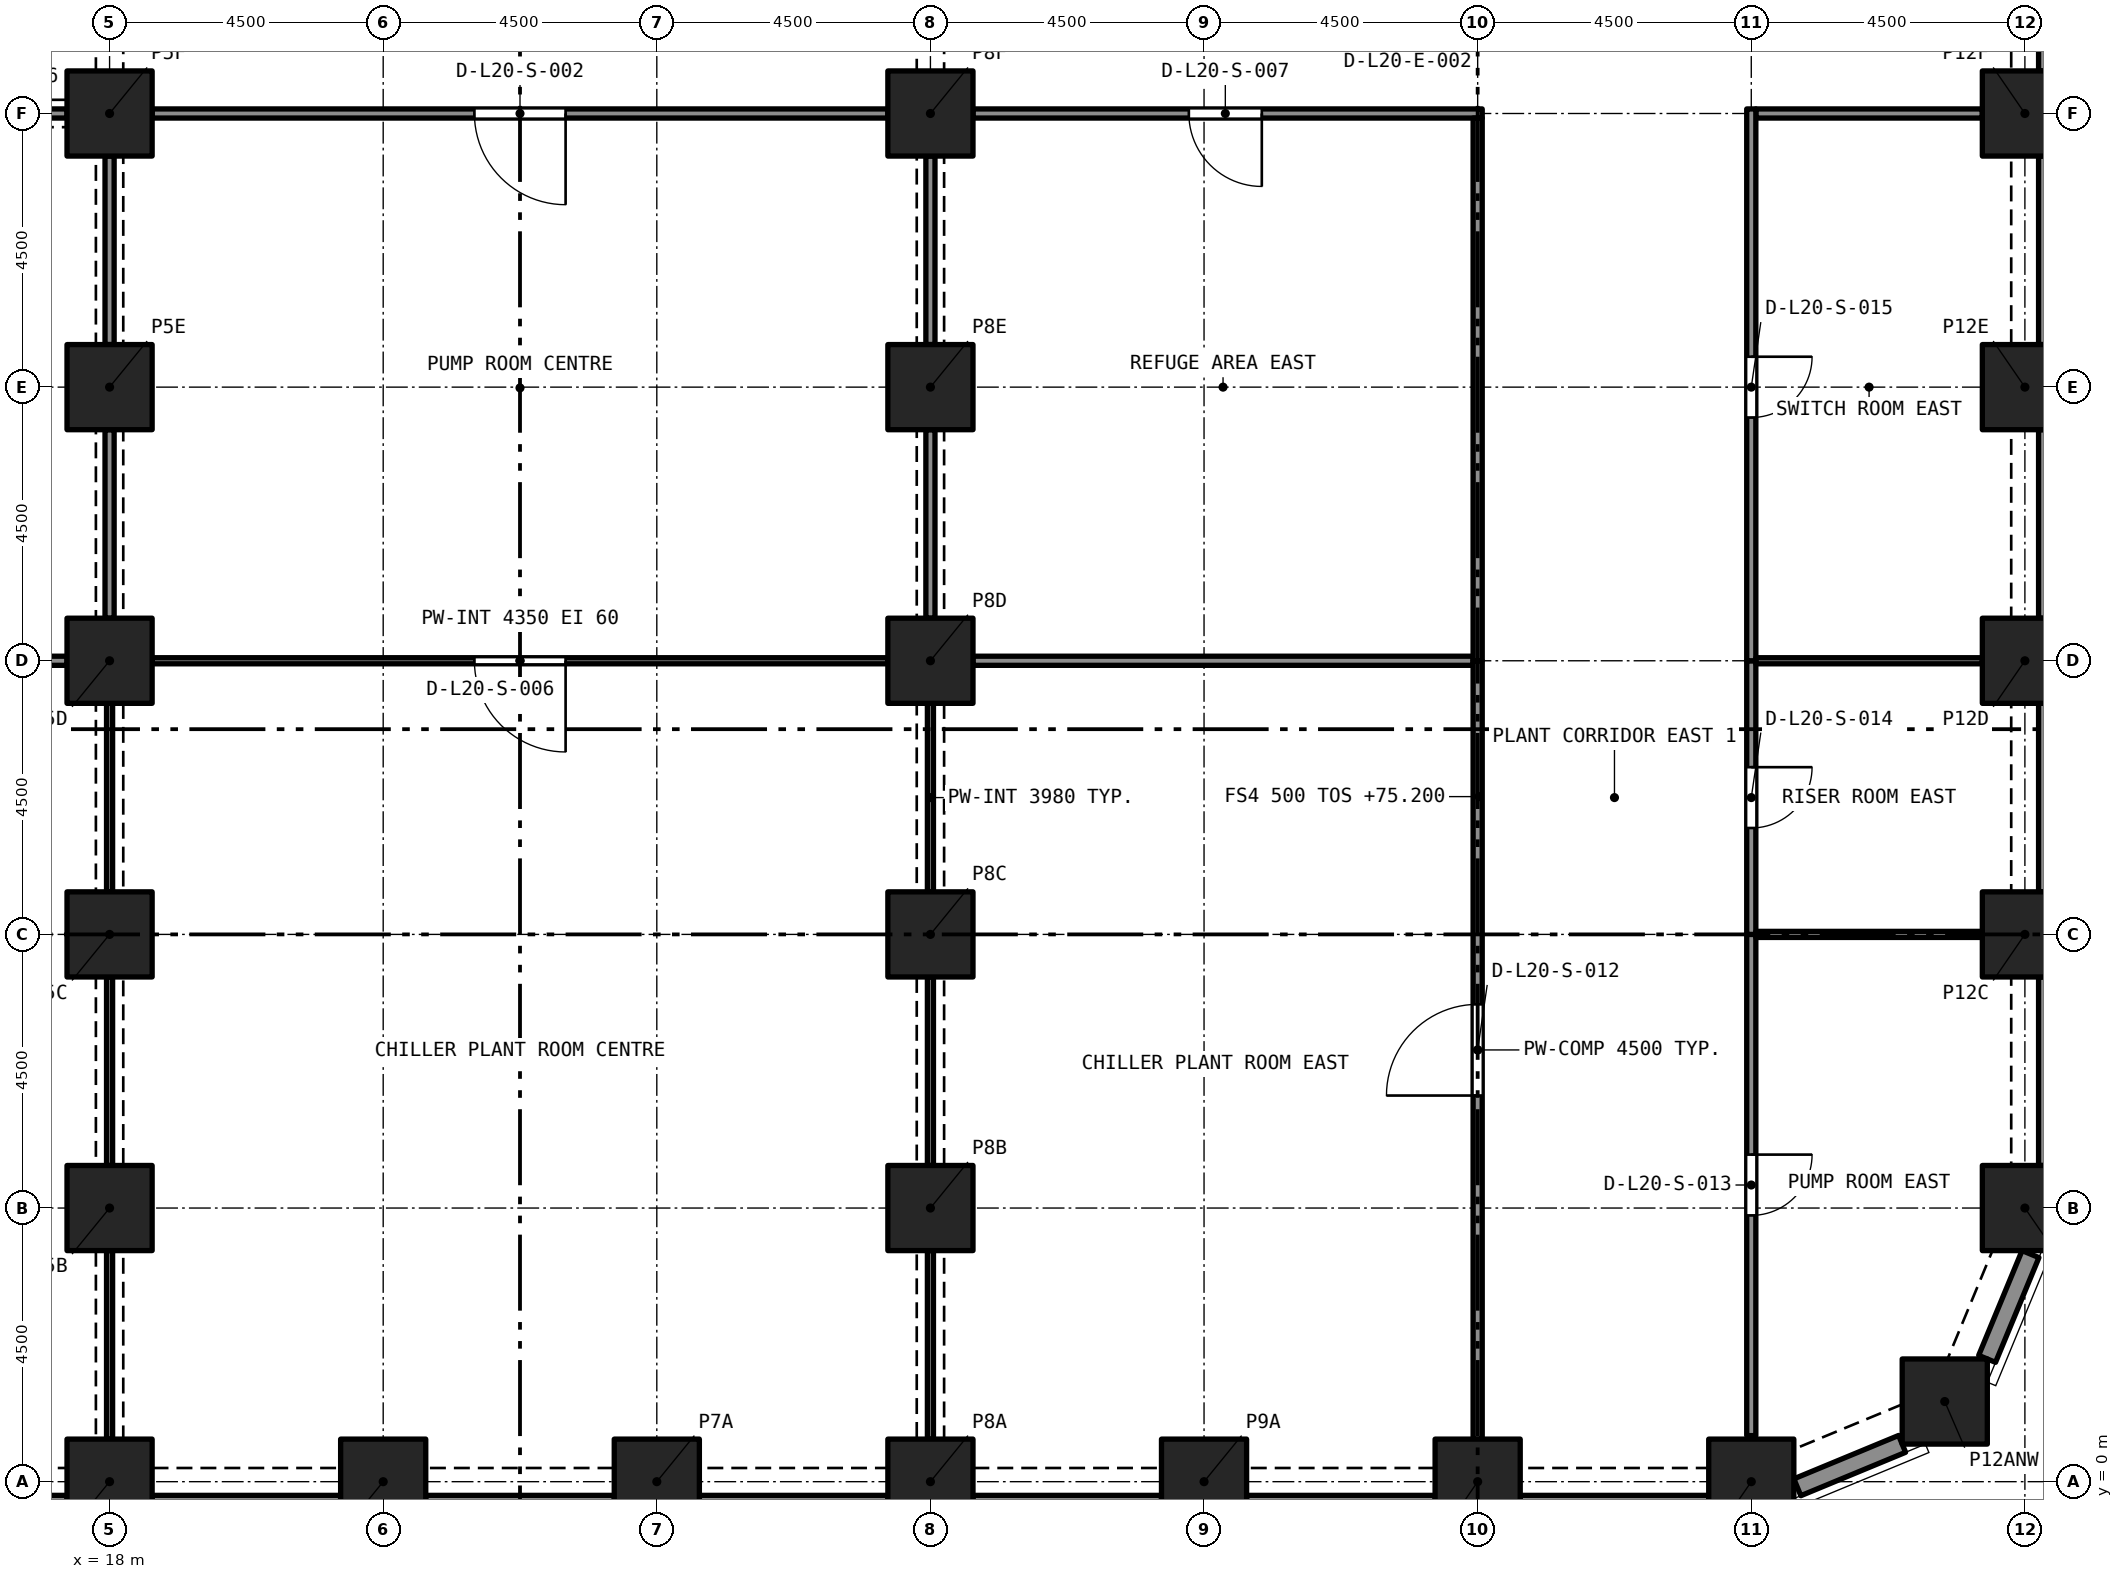
"""IFC4 building model, lengths in metres.
Left out: names, types, materials, properties, quantities, classifications, styles, units other than length and angle.
Written with IfcOpenShell. Run it as: python <this file> out.ifc"""

import sys

from ifc_helpers import new_model, si_unit, direction, frame, frame_2d, origin, origin_2d, place, context, subcontext, project, spatial, rectangle, extrude, element, fill, save


model = new_model("IFC4")
c1 = context("Model", 3, precision=1e-05, world=origin(), true_north=direction((0.0, 1.0)))
c2 = subcontext(c1, "Body", "Model", "MODEL_VIEW")
j1 = project(units=[si_unit("LENGTHUNIT", "METRE"), si_unit("PLANEANGLEUNIT", "RADIAN")], contexts=[c1])
p1 = place(None, origin())
s1 = spatial("IfcSite", under=j1, at=p1, CompositionType="ELEMENT")
p2 = place(p1, origin())
s2 = spatial("IfcBuilding", under=s1, at=p2, CompositionType="ELEMENT")
p3 = place(p2, frame((0.0, 0.0, 75.2)))
s3 = spatial("IfcBuildingStorey", under=s2, at=p3, CompositionType="ELEMENT", Elevation=75.2)
for number, where, z_axis, x_axis in (
    (1, (18.0, 0.0, 0.0), (0.0, 0.0, 1.0), (1.0, 0.0, 0.0)),
    (2, (22.5, 0.0, 0.0), (0.0, 0.0, 1.0), (1.0, 0.0, 0.0)),
    (3, (27.0, 0.0, 0.0), (0.0, 0.0, 1.0), (1.0, 0.0, 0.0)),
    (4, (31.5, 0.0, 0.0), (0.0, 0.0, 1.0), (1.0, 0.0, 0.0)),
    (5, (36.0, 0.0, 0.0), (0.0, 0.0, 1.0), (1.0, 0.0, 0.0)),
    (6, (40.5, 0.0, 0.0), (0.0, 0.0, 1.0), (1.0, 0.0, 0.0)),
    (7, (45.0, 0.0, 0.0), (0.0, 0.0, 1.0), (1.0, 0.0, 0.0)),
    (8, (48.182, 1.318, 0.0), (0.0, 0.0, 1.0), (1.0, 0.0, 0.0)),
    (9, (18.0, 4.5, 0.0), (0.0, 0.0, 1.0), (1.0, 0.0, 0.0)),
    (10, (31.5, 4.5, 0.0), (0.0, 0.0, 1.0), (1.0, 0.0, 0.0)),
    (11, (49.5, 4.5, 0.0), (0.0, 0.0, 1.0), (1.0, 0.0, 0.0)),
    (12, (18.0, 9.0, 0.0), (0.0, 0.0, 1.0), (1.0, 0.0, 0.0)),
    (13, (31.5, 9.0, 0.0), (0.0, 0.0, 1.0), (1.0, 0.0, 0.0)),
    (14, (49.5, 9.0, 0.0), (0.0, 0.0, 1.0), (1.0, 0.0, 0.0)),
    (15, (18.0, 13.5, 0.0), (0.0, 0.0, 1.0), (1.0, 0.0, 0.0)),
    (16, (31.5, 13.5, 0.0), (0.0, 0.0, 1.0), (1.0, 0.0, 0.0)),
    (17, (49.5, 13.5, 0.0), (0.0, 0.0, 1.0), (1.0, 0.0, 0.0)),
    (18, (18.0, 18.0, 0.0), (0.0, 0.0, 1.0), (1.0, 0.0, 0.0)),
    (19, (31.5, 18.0, 0.0), (0.0, 0.0, 1.0), (1.0, 0.0, 0.0)),
    (20, (49.5, 18.0, 0.0), (0.0, 0.0, 1.0), (1.0, 0.0, 0.0)),
    (21, (18.0, 22.5, 0.0), (0.0, 0.0, 1.0), (1.0, 0.0, 0.0)),
    (22, (31.5, 22.5, 0.0), (0.0, 0.0, 1.0), (1.0, 0.0, 0.0)),
    (23, (49.5, 22.5, 0.0), (0.0, 0.0, 1.0), (1.0, 0.0, 0.0)),
):
    element("IfcColumn", number, at=place(p3, frame(where, z_axis=z_axis, x_axis=x_axis)), inside=s3, PredefinedType="COLUMN", context=c2, shape_type="SweptSolid", body=[
        extrude(rectangle(XDim=1.4, YDim=1.4, at=origin_2d()), origin(), (0.0, 0.0, 1.0), 4.8),
    ])
for number, where, z_axis, x_axis in (
    (24, (17.3, -0.375, 0.0), (0.0, 0.0, 1.0), (-1.0, 0.0, 0.0)),
    (25, (21.8, -0.375, 0.0), (0.0, 0.0, 1.0), (-1.0, 0.0, 0.0)),
    (26, (26.3, -0.375, 0.0), (0.0, 0.0, 1.0), (-1.0, 0.0, 0.0)),
    (27, (30.8, -0.375, 0.0), (0.0, 0.0, 1.0), (-1.0, 0.0, 0.0)),
    (28, (35.3, -0.375, 0.0), (0.0, 0.0, 1.0), (-1.0, 0.0, 0.0)),
    (29, (39.8, -0.375, 0.0), (0.0, 0.0, 1.0), (-1.0, 0.0, 0.0)),
    (30, (44.3, -0.375, 0.0), (0.0, 0.0, 1.0), (-1.0, 0.0, 0.0)),
):
    element("IfcWall", number, at=place(p3, frame(where, z_axis=z_axis, x_axis=x_axis)), inside=s3, PredefinedType="SOLIDWALL", context=c2, shape_type="SweptSolid", body=[
        extrude(rectangle(XDim=3.1, YDim=0.3, at=frame_2d((1.55, 0.0))), origin(), (0.0, 0.0, 1.0), 4.8),
    ])
p4 = place(p3, frame((47.48, 0.622, 0.0), z_axis=(0.0, 0.0, 1.0), x_axis=(-0.923903565336, -0.38262540684, 0.0)))
e31 = element("IfcWall", 31, at=p4, inside=s3, PredefinedType="SOLIDWALL", context=c2, shape_type="SweptSolid", body=[
    extrude(rectangle(XDim=1.865, YDim=0.3, at=frame_2d((0.933, 0.0))), origin(), (0.0, 0.0, 1.0), 4.8),
])
p5 = place(p3, frame((49.592, 3.743, 0.0), z_axis=(0.0, 0.0, 1.0), x_axis=(-0.382737135771, -0.923857286003, 0.0)))
e32 = element("IfcWall", 32, at=p5, inside=s3, PredefinedType="SOLIDWALL", context=c2, shape_type="SweptSolid", body=[
    extrude(rectangle(XDim=1.865, YDim=0.3, at=frame_2d((0.933, 0.0))), origin(), (0.0, 0.0, 1.0), 4.8),
])
for number, where, z_axis, x_axis in (
    (33, (49.875, 8.3, 0.0), (0.0, 0.0, 1.0), (0.0, -1.0, 0.0)),
    (34, (49.875, 12.8, 0.0), (0.0, 0.0, 1.0), (0.0, -1.0, 0.0)),
    (35, (49.875, 17.3, 0.0), (0.0, 0.0, 1.0), (0.0, -1.0, 0.0)),
    (36, (49.875, 21.8, 0.0), (0.0, 0.0, 1.0), (0.0, -1.0, 0.0)),
    (37, (49.875, 26.3, 0.0), (0.0, 0.0, 1.0), (0.0, -1.0, 0.0)),
):
    element("IfcWall", number, at=place(p3, frame(where, z_axis=z_axis, x_axis=x_axis)), inside=s3, PredefinedType="SOLIDWALL", context=c2, shape_type="SweptSolid", body=[
        extrude(rectangle(XDim=3.1, YDim=0.3, at=frame_2d((1.55, 0.0))), origin(), (0.0, 0.0, 1.0), 4.8),
    ])
p6 = place(p3, frame((30.8, 22.5, 0.0), z_axis=(0.0, 0.0, 1.0), x_axis=(-1.0, 0.0, 0.0)))
e38 = element("IfcWall", 38, at=p6, inside=s3, PredefinedType="PARTITIONING", context=c2, shape_type="SweptSolid", body=[
    extrude(rectangle(XDim=12.1, YDim=0.15, at=frame_2d((6.05, 0.0))), origin(), (0.0, 0.0, 1.0), 4.35),
])
p7 = place(p6, frame((5.3, 0.0, 0.0)))
e39 = element("IfcOpeningElement", 39, at=p7, cuts=e38, PredefinedType="OPENING", context=c2, shape_type="SweptSolid", body=[
    extrude(rectangle(XDim=1.5, YDim=2.4, at=frame_2d((0.75, 1.2))), frame((0.0, 0.085, 0.0), z_axis=(0.0, -1.0, 0.0), x_axis=(1.0, 0.0, 0.0)), (0.0, 0.0, 1.0), 0.17),
])
p8 = place(p3, frame((30.8, 13.5, 0.0), z_axis=(0.0, 0.0, 1.0), x_axis=(-1.0, 0.0, 0.0)))
e40 = element("IfcWall", 40, at=p8, inside=s3, PredefinedType="PARTITIONING", context=c2, shape_type="SweptSolid", body=[
    extrude(rectangle(XDim=12.1, YDim=0.1, at=frame_2d((6.05, 0.0))), origin(), (0.0, 0.0, 1.0), 4.35),
])
p9 = place(p8, frame((5.3, 0.0, 0.0)))
e41 = element("IfcOpeningElement", 41, at=p9, cuts=e40, PredefinedType="OPENING", context=c2, shape_type="SweptSolid", body=[
    extrude(rectangle(XDim=1.5, YDim=2.4, at=frame_2d((0.75, 1.2))), frame((0.0, 0.06, 0.0), z_axis=(0.0, -1.0, 0.0), x_axis=(1.0, 0.0, 0.0)), (0.0, 0.0, 1.0), 0.12),
])
for number, where, z_axis, x_axis in (
    (42, (31.5, 9.7, 0.0), (0.0, 0.0, 1.0), (0.0, 1.0, 0.0)),
    (43, (31.5, 5.2, 0.0), (0.0, 0.0, 1.0), (0.0, 1.0, 0.0)),
    (44, (31.5, 0.7, 0.0), (0.0, 0.0, 1.0), (0.0, 1.0, 0.0)),
    (45, (18.0, 0.7, 0.0), (0.0, 0.0, 1.0), (0.0, 1.0, 0.0)),
    (46, (18.0, 5.2, 0.0), (0.0, 0.0, 1.0), (0.0, 1.0, 0.0)),
    (47, (18.0, 9.7, 0.0), (0.0, 0.0, 1.0), (0.0, 1.0, 0.0)),
):
    element("IfcWall", number, at=place(p3, frame(where, z_axis=z_axis, x_axis=x_axis)), inside=s3, PredefinedType="PARTITIONING", context=c2, shape_type="SweptSolid", body=[
        extrude(rectangle(XDim=3.1, YDim=0.1, at=frame_2d((1.55, 0.0))), origin(), (0.0, 0.0, 1.0), 3.98),
    ])
for number, where, z_axis, x_axis in (
    (48, (31.5, 18.7, 0.0), (0.0, 0.0, 1.0), (0.0, 1.0, 0.0)),
    (49, (31.5, 14.2, 0.0), (0.0, 0.0, 1.0), (0.0, 1.0, 0.0)),
    (50, (18.0, 14.2, 0.0), (0.0, 0.0, 1.0), (0.0, 1.0, 0.0)),
    (51, (18.0, 18.7, 0.0), (0.0, 0.0, 1.0), (0.0, 1.0, 0.0)),
):
    element("IfcWall", number, at=place(p3, frame(where, z_axis=z_axis, x_axis=x_axis)), inside=s3, PredefinedType="PARTITIONING", context=c2, shape_type="SweptSolid", body=[
        extrude(rectangle(XDim=3.1, YDim=0.15, at=frame_2d((1.55, 0.0))), origin(), (0.0, 0.0, 1.0), 3.98),
    ])
p10 = place(p3, frame((40.575, 22.5, 0.0), z_axis=(0.0, 0.0, 1.0), x_axis=(-1.0, 0.0, 0.0)))
e52 = element("IfcWall", 52, at=p10, inside=s3, PredefinedType="PARTITIONING", context=c2, shape_type="SweptSolid", body=[
    extrude(rectangle(XDim=8.375, YDim=0.15, at=frame_2d((4.188, 0.0))), origin(), (0.0, 0.0, 1.0), 4.5),
])
p11 = place(p10, frame((3.625, 0.0, 0.0)))
e53 = element("IfcOpeningElement", 53, at=p11, cuts=e52, PredefinedType="OPENING", context=c2, shape_type="SweptSolid", body=[
    extrude(rectangle(XDim=1.2, YDim=2.1, at=frame_2d((0.6, 1.05))), frame((0.0, 0.085, 0.0), z_axis=(0.0, -1.0, 0.0), x_axis=(1.0, 0.0, 0.0)), (0.0, 0.0, 1.0), 0.17),
])
p12 = place(p3, frame((45.075, 22.5, 0.0), z_axis=(0.0, 0.0, 1.0), x_axis=(1.0, 0.0, 0.0)))
e54 = element("IfcWall", 54, at=p12, inside=s3, PredefinedType="PARTITIONING", context=c2, shape_type="SweptSolid", body=[
    extrude(rectangle(XDim=3.725, YDim=0.15, at=frame_2d((1.863, 0.0))), origin(), (0.0, 0.0, 1.0), 4.5),
])
p13 = place(p3, frame((32.2, 13.5, 0.0), z_axis=(0.0, 0.0, 1.0), x_axis=(1.0, 0.0, 0.0)))
e55 = element("IfcWall", 55, at=p13, inside=s3, PredefinedType="PARTITIONING", context=c2, shape_type="SweptSolid", body=[
    extrude(rectangle(XDim=8.225, YDim=0.15, at=frame_2d((4.113, 0.0))), origin(), (0.0, 0.0, 1.0), 4.5),
])
p14 = place(p3, frame((40.5, 0.7, 0.0), z_axis=(0.0, 0.0, 1.0), x_axis=(0.0, 1.0, 0.0)))
e56 = element("IfcWall", 56, at=p14, inside=s3, PredefinedType="PARTITIONING", context=c2, shape_type="SweptSolid", body=[
    extrude(rectangle(XDim=12.8, YDim=0.15, at=frame_2d((6.4, 0.0))), origin(), (0.0, 0.0, 1.0), 4.5),
])
p15 = place(p14, frame((5.65, 0.0, 0.0)))
e57 = element("IfcOpeningElement", 57, at=p15, cuts=e56, PredefinedType="OPENING", context=c2, shape_type="SweptSolid", body=[
    extrude(rectangle(XDim=1.5, YDim=2.4, at=frame_2d((0.75, 1.2))), frame((0.0, 0.085, 0.0), z_axis=(0.0, -1.0, 0.0), x_axis=(1.0, 0.0, 0.0)), (0.0, 0.0, 1.0), 0.17),
])
p16 = place(p3, frame((40.5, 13.5, 0.0), z_axis=(0.0, 0.0, 1.0), x_axis=(0.0, 1.0, 0.0)))
e58 = element("IfcWall", 58, at=p16, inside=s3, PredefinedType="PARTITIONING", context=c2, shape_type="SweptSolid", body=[
    extrude(rectangle(XDim=8.925, YDim=0.15, at=frame_2d((4.462, 0.0))), origin(), (0.0, 0.0, 1.0), 4.5),
])
p17 = place(p3, frame((45.0, 9.0, 0.0), z_axis=(0.0, 0.0, 1.0), x_axis=(0.0, -1.0, 0.0)))
e59 = element("IfcWall", 59, at=p17, inside=s3, PredefinedType="PARTITIONING", context=c2, shape_type="SweptSolid", body=[
    extrude(rectangle(XDim=8.242, YDim=0.15, at=frame_2d((4.121, 0.0))), origin(), (0.0, 0.0, 1.0), 4.5),
])
p18 = place(p17, frame((3.621, 0.0, 0.0)))
e60 = element("IfcOpeningElement", 60, at=p18, cuts=e59, PredefinedType="OPENING", context=c2, shape_type="SweptSolid", body=[
    extrude(rectangle(XDim=1.0, YDim=2.1, at=frame_2d((0.5, 1.05))), frame((0.0, 0.085, 0.0), z_axis=(0.0, -1.0, 0.0), x_axis=(1.0, 0.0, 0.0)), (0.0, 0.0, 1.0), 0.17),
])
p19 = place(p3, frame((45.0, 13.5, 0.0), z_axis=(0.0, 0.0, 1.0), x_axis=(0.0, -1.0, 0.0)))
e61 = element("IfcWall", 61, at=p19, inside=s3, PredefinedType="PARTITIONING", context=c2, shape_type="SweptSolid", body=[
    extrude(rectangle(XDim=4.5, YDim=0.15, at=frame_2d((2.25, 0.0))), origin(), (0.0, 0.0, 1.0), 4.5),
])
p20 = place(p19, frame((1.75, 0.0, 0.0)))
e62 = element("IfcOpeningElement", 62, at=p20, cuts=e61, PredefinedType="OPENING", context=c2, shape_type="SweptSolid", body=[
    extrude(rectangle(XDim=1.0, YDim=2.1, at=frame_2d((0.5, 1.05))), frame((0.0, 0.085, 0.0), z_axis=(0.0, -1.0, 0.0), x_axis=(1.0, 0.0, 0.0)), (0.0, 0.0, 1.0), 0.17),
])
p21 = place(p3, frame((45.0, 22.575, 0.0), z_axis=(0.0, 0.0, 1.0), x_axis=(0.0, -1.0, 0.0)))
e63 = element("IfcWall", 63, at=p21, inside=s3, PredefinedType="PARTITIONING", context=c2, shape_type="SweptSolid", body=[
    extrude(rectangle(XDim=9.075, YDim=0.15, at=frame_2d((4.538, 0.0))), origin(), (0.0, 0.0, 1.0), 4.5),
])
p22 = place(p21, frame((4.075, 0.0, 0.0)))
e64 = element("IfcOpeningElement", 64, at=p22, cuts=e63, PredefinedType="OPENING", context=c2, shape_type="SweptSolid", body=[
    extrude(rectangle(XDim=1.0, YDim=2.1, at=frame_2d((0.5, 1.05))), frame((0.0, 0.085, 0.0), z_axis=(0.0, -1.0, 0.0), x_axis=(1.0, 0.0, 0.0)), (0.0, 0.0, 1.0), 0.17),
])
for number, where, z_axis, x_axis in (
    (65, (45.075, 9.0, 0.0), (0.0, 0.0, 1.0), (1.0, 0.0, 0.0)),
    (66, (45.075, 13.5, 0.0), (0.0, 0.0, 1.0), (1.0, 0.0, 0.0)),
):
    element("IfcWall", number, at=place(p3, frame(where, z_axis=z_axis, x_axis=x_axis)), inside=s3, PredefinedType="PARTITIONING", context=c2, shape_type="SweptSolid", body=[
        extrude(rectangle(XDim=3.725, YDim=0.1, at=frame_2d((1.863, 0.0))), origin(), (0.0, 0.0, 1.0), 4.5),
    ])
p23 = place(p3, frame((17.3, 22.5, 0.0), z_axis=(0.0, 0.0, 1.0), x_axis=(-1.0, 0.0, 0.0)))
e67 = element("IfcWall", 67, at=p23, inside=s3, PredefinedType="PARTITIONING", context=c2, shape_type="SweptSolid", body=[
    extrude(rectangle(XDim=3.1, YDim=0.15, at=frame_2d((1.55, 0.0))), origin(), (0.0, 0.0, 1.0), 3.98),
])
p24 = place(p23, frame((0.95, 0.0, 0.0)))
e68 = element("IfcOpeningElement", 68, at=p24, cuts=e67, PredefinedType="OPENING", context=c2, shape_type="SweptSolid", body=[
    extrude(rectangle(XDim=1.2, YDim=2.1, at=frame_2d((0.6, 1.05))), frame((0.0, 0.085, 0.0), z_axis=(0.0, -1.0, 0.0), x_axis=(1.0, 0.0, 0.0)), (0.0, 0.0, 1.0), 0.17),
])
p25 = place(p3, frame((9.075, 13.5, 0.0), z_axis=(0.0, 0.0, 1.0), x_axis=(1.0, 0.0, 0.0)))
e69 = element("IfcWall", 69, at=p25, inside=s3, PredefinedType="PARTITIONING", context=c2, shape_type="SweptSolid", body=[
    extrude(rectangle(XDim=8.225, YDim=0.15, at=frame_2d((4.113, 0.0))), origin(), (0.0, 0.0, 1.0), 4.5),
])
p26 = place(p7, origin())
e70 = element("IfcDoor", 70, at=p26, inside=s3, OperationType="DOUBLE_DOOR_SINGLE_SWING", PredefinedType="DOOR", context=c2, shape_type="SweptSolid", body=[
    extrude(rectangle(XDim=1.5, YDim=2.4, at=frame_2d((0.75, 1.2))), frame((0.0, 0.025, 0.0), z_axis=(0.0, -1.0, 0.0), x_axis=(1.0, 0.0, 0.0)), (0.0, 0.0, 1.0), 0.05),
])
fill(e39, e70)
p27 = place(p9, origin())
e71 = element("IfcDoor", 71, at=p27, inside=s3, OperationType="DOUBLE_DOOR_SINGLE_SWING", PredefinedType="DOOR", context=c2, shape_type="SweptSolid", body=[
    extrude(rectangle(XDim=1.5, YDim=2.4, at=frame_2d((0.75, 1.2))), frame((0.0, 0.025, 0.0), z_axis=(0.0, -1.0, 0.0), x_axis=(1.0, 0.0, 0.0)), (0.0, 0.0, 1.0), 0.05),
])
fill(e41, e71)
p28 = place(p11, origin())
e72 = element("IfcDoor", 72, at=p28, inside=s3, OperationType="SINGLE_SWING_RIGHT", PredefinedType="DOOR", context=c2, shape_type="SweptSolid", body=[
    extrude(rectangle(XDim=1.2, YDim=2.1, at=frame_2d((0.6, 1.05))), frame((0.0, 0.025, 0.0), z_axis=(0.0, -1.0, 0.0), x_axis=(1.0, 0.0, 0.0)), (0.0, 0.0, 1.0), 0.05),
])
fill(e53, e72)
p29 = place(p15, origin())
e73 = element("IfcDoor", 73, at=p29, inside=s3, OperationType="DOUBLE_DOOR_SINGLE_SWING", PredefinedType="DOOR", context=c2, shape_type="SweptSolid", body=[
    extrude(rectangle(XDim=1.5, YDim=2.4, at=frame_2d((0.75, 1.2))), frame((0.0, 0.025, 0.0), z_axis=(0.0, -1.0, 0.0), x_axis=(1.0, 0.0, 0.0)), (0.0, 0.0, 1.0), 0.05),
])
fill(e57, e73)
p30 = place(p18, origin())
e74 = element("IfcDoor", 74, at=p30, inside=s3, OperationType="SINGLE_SWING_RIGHT", PredefinedType="DOOR", context=c2, shape_type="SweptSolid", body=[
    extrude(rectangle(XDim=1.0, YDim=2.1, at=frame_2d((0.5, 1.05))), frame((0.0, 0.025, 0.0), z_axis=(0.0, -1.0, 0.0), x_axis=(1.0, 0.0, 0.0)), (0.0, 0.0, 1.0), 0.05),
])
fill(e60, e74)
p31 = place(p20, origin())
e75 = element("IfcDoor", 75, at=p31, inside=s3, OperationType="SINGLE_SWING_RIGHT", PredefinedType="DOOR", context=c2, shape_type="SweptSolid", body=[
    extrude(rectangle(XDim=1.0, YDim=2.1, at=frame_2d((0.5, 1.05))), frame((0.0, 0.025, 0.0), z_axis=(0.0, -1.0, 0.0), x_axis=(1.0, 0.0, 0.0)), (0.0, 0.0, 1.0), 0.05),
])
fill(e62, e75)
p32 = place(p22, origin())
e76 = element("IfcDoor", 76, at=p32, inside=s3, OperationType="SINGLE_SWING_RIGHT", PredefinedType="DOOR", context=c2, shape_type="SweptSolid", body=[
    extrude(rectangle(XDim=1.0, YDim=2.1, at=frame_2d((0.5, 1.05))), frame((0.0, 0.025, 0.0), z_axis=(0.0, -1.0, 0.0), x_axis=(1.0, 0.0, 0.0)), (0.0, 0.0, 1.0), 0.05),
])
fill(e64, e76)
save(model, sys.argv[1])
